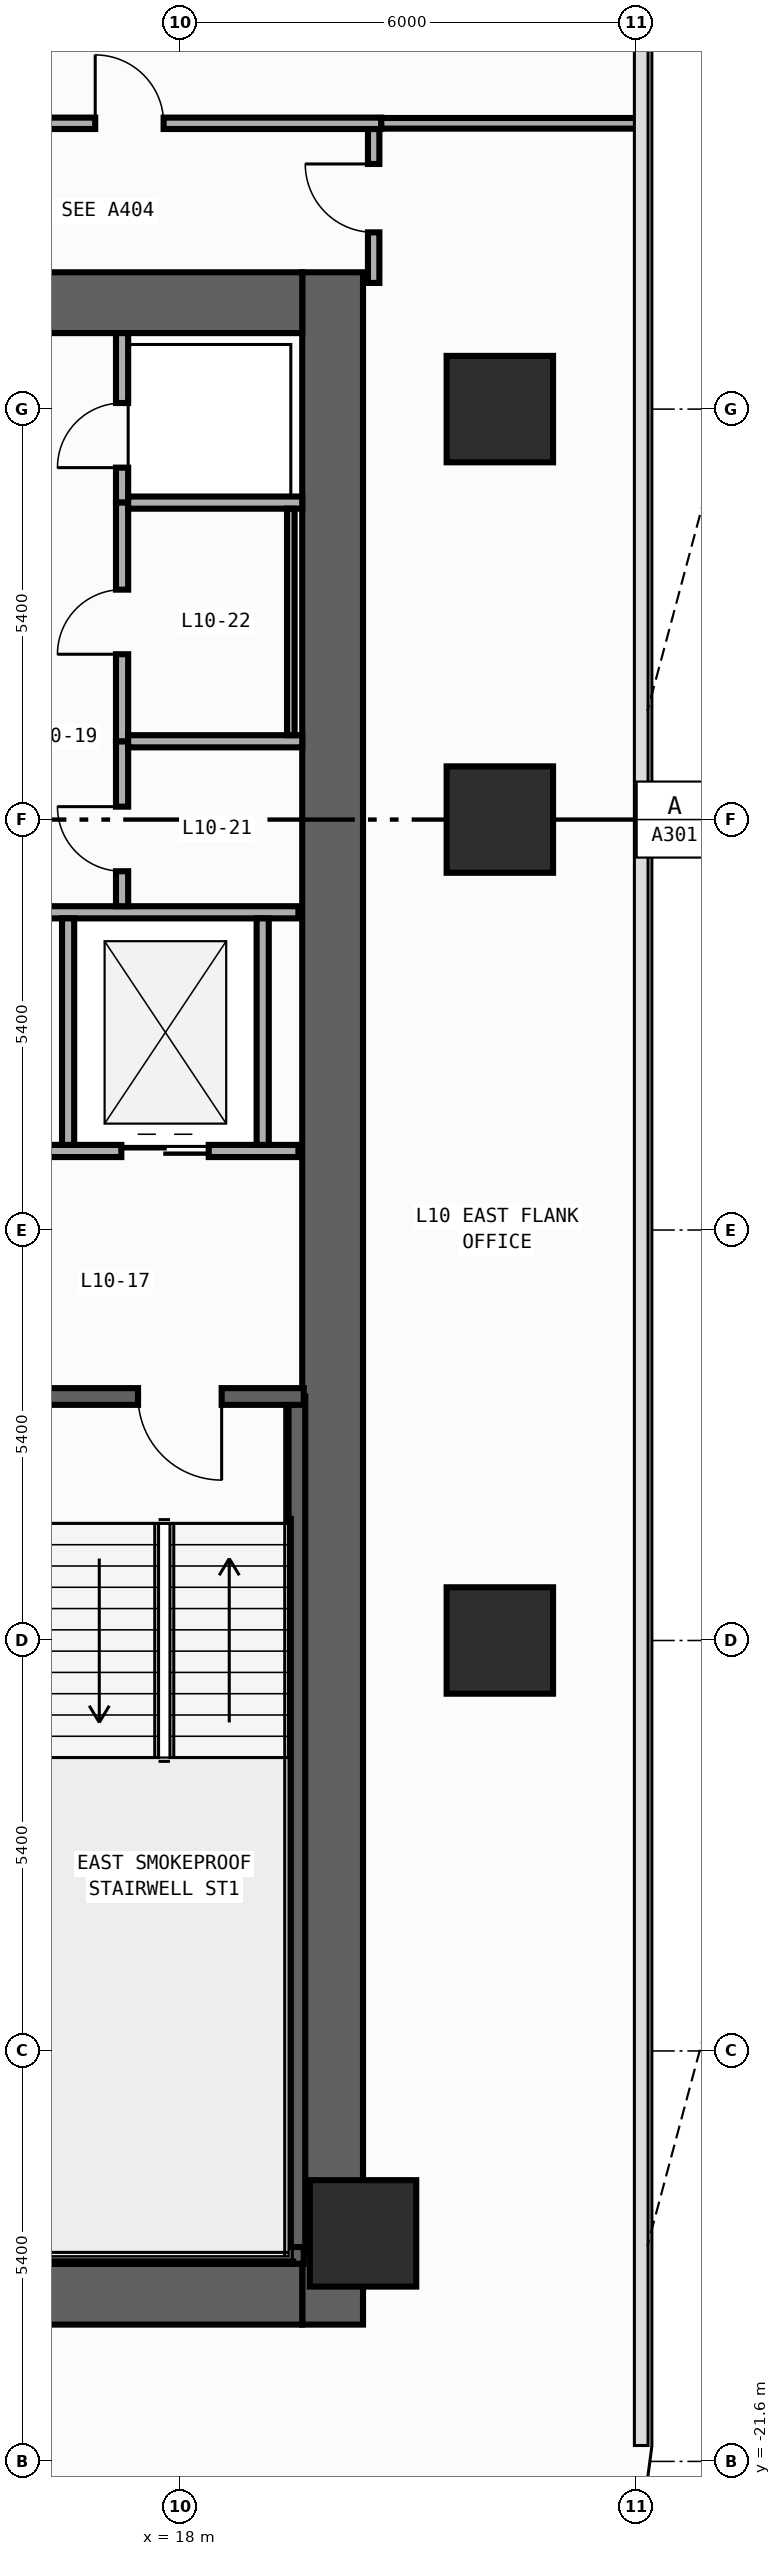
"""IFC4 building model, lengths in metres.
Left out: names, types, materials, properties, quantities, classifications, styles, units other than length and angle.
Written with IfcOpenShell. Run it as: python <this file> out.ifc"""

import sys

from ifc_helpers import new_model, si_unit, direction, frame, frame_2d, origin, origin_2d, place, context, subcontext, project, spatial, rectangle, extrude, element, fill, save


model = new_model("IFC4")
c1 = context("Model", 3, precision=1e-05, world=origin(), true_north=direction((0.0, 1.0)))
c2 = subcontext(c1, "Body", "Model", "MODEL_VIEW")
j1 = project(units=[si_unit("LENGTHUNIT", "METRE"), si_unit("PLANEANGLEUNIT", "RADIAN")], contexts=[c1])
p1 = place(None, origin())
s1 = spatial("IfcSite", under=j1, at=p1, CompositionType="ELEMENT")
p2 = place(p1, origin())
s2 = spatial("IfcBuilding", under=s1, at=p2, CompositionType="ELEMENT")
p3 = place(p2, frame((0.0, 0.0, 42.8)))
s3 = spatial("IfcBuildingStorey", under=s2, at=p3, CompositionType="ELEMENT", Elevation=42.8)
p4 = place(p3, frame((20.0, -19.8, 0.0), z_axis=(0.0, 0.0, 1.0), x_axis=(0.0, 1.0, 0.0)))
e1 = element("IfcWall", 1, at=p4, inside=s3, PredefinedType="SHEAR", context=c2, shape_type="SweptSolid", body=[
    extrude(rectangle(XDim=27.0, YDim=0.8, at=frame_2d((13.5, 0.0))), origin(), (0.0, 0.0, 1.0), 3.94),
])
for number, where, z_axis, x_axis in (
    (2, (12.8, -19.4, 0.0), (0.0, 0.0, 1.0), (1.0, 0.0, 0.0)),
    (3, (12.8, 6.8, 0.0), (0.0, 0.0, 1.0), (1.0, 0.0, 0.0)),
):
    element("IfcWall", number, at=place(p3, frame(where, z_axis=z_axis, x_axis=x_axis)), inside=s3, PredefinedType="SHEAR", context=c2, shape_type="SweptSolid", body=[
        extrude(rectangle(XDim=6.8, YDim=0.8, at=frame_2d((3.4, 0.0))), origin(), (0.0, 0.0, 1.0), 3.94),
    ])
p5 = place(p3, frame((19.53, -18.89, 0.0), z_axis=(0.0, 0.0, 1.0), x_axis=(0.0, 1.0, 0.0)))
e4 = element("IfcWall", 4, at=p5, inside=s3, PredefinedType="SHEAR", context=c2, shape_type="SweptSolid", body=[
    extrude(rectangle(XDim=11.3, YDim=0.22, at=frame_2d((5.65, 0.0))), origin(), (0.0, 0.0, 1.0), 3.94),
])
p6 = place(p3, frame((15.705, -18.89, 0.0), z_axis=(0.0, 0.0, 1.0), x_axis=(1.0, 0.0, 0.0)))
e5 = element("IfcWall", 5, at=p6, inside=s3, PredefinedType="SHEAR", context=c2, shape_type="SweptSolid", body=[
    extrude(rectangle(XDim=3.915, YDim=0.22, at=frame_2d((1.958, 0.0))), origin(), (0.0, 0.0, 1.0), 3.94),
])
p7 = place(p3, frame((19.62, -7.59, 0.0), z_axis=(0.0, 0.0, 1.0), x_axis=(-1.0, 0.0, 0.0)))
e6 = element("IfcWall", 6, at=p7, inside=s3, PredefinedType="SHEAR", context=c2, shape_type="SweptSolid", body=[
    extrude(rectangle(XDim=3.915, YDim=0.22, at=frame_2d((1.958, 0.0))), origin(), (0.0, 0.0, 1.0), 3.94),
])
p8 = place(p7, frame((1.08, 0.0, 0.0)))
e7 = element("IfcOpeningElement", 7, at=p8, cuts=e6, PredefinedType="OPENING", context=c2, shape_type="SweptSolid", body=[
    extrude(rectangle(XDim=1.1, YDim=2.2, at=frame_2d((0.55, 1.1))), frame((0.0, 0.12, 0.0), z_axis=(0.0, -1.0, 0.0), x_axis=(1.0, 0.0, 0.0)), (0.0, 0.0, 1.0), 0.24),
])
for number, where, z_axis, x_axis in (
    (8, (20.4, -18.6, 0.0), (0.0, 0.0, 1.0), (1.0, 0.0, 0.0)),
    (9, (22.2, -10.8, 0.0), (0.0, 0.0, 1.0), (1.0, 0.0, 0.0)),
    (10, (22.2, 0.0, 0.0), (0.0, 0.0, 1.0), (1.0, 0.0, 0.0)),
    (11, (22.2, 5.4, 0.0), (0.0, 0.0, 1.0), (1.0, 0.0, 0.0)),
):
    element("IfcColumn", number, at=place(p3, frame(where, z_axis=z_axis, x_axis=x_axis)), inside=s3, PredefinedType="COLUMN", context=c2, shape_type="SweptSolid", body=[
        extrude(rectangle(XDim=1.4, YDim=1.4, at=origin_2d()), origin(), (0.0, 0.0, 1.0), 4.2),
    ])
p9 = place(p3, frame((15.75, -4.36, 0.0), z_axis=(0.0, 0.0, 1.0), x_axis=(1.0, 0.0, 0.0)))
e12 = element("IfcWall", 12, at=p9, inside=s3, PredefinedType="STANDARD", context=c2, shape_type="SweptSolid", body=[
    extrude(rectangle(XDim=3.8, YDim=0.16, at=frame_2d((1.9, 0.0))), origin(), (0.0, 0.0, 1.0), 3.94),
])
p10 = place(p9, frame((1.47, 0.0, 0.0)))
e13 = element("IfcOpeningElement", 13, at=p10, cuts=e12, PredefinedType="OPENING", context=c2, shape_type="SweptSolid", body=[
    extrude(rectangle(XDim=1.15, YDim=2.2, at=frame_2d((0.575, 1.1))), frame((0.0, 0.09, 0.0), z_axis=(0.0, -1.0, 0.0), x_axis=(1.0, 0.0, 0.0)), (0.0, 0.0, 1.0), 0.18),
])
p11 = place(p3, frame((15.75, -1.22, 0.0), z_axis=(0.0, 0.0, 1.0), x_axis=(1.0, 0.0, 0.0)))
e14 = element("IfcWall", 14, at=p11, inside=s3, PredefinedType="STANDARD", context=c2, shape_type="SweptSolid", body=[
    extrude(rectangle(XDim=3.8, YDim=0.16, at=frame_2d((1.9, 0.0))), origin(), (0.0, 0.0, 1.0), 3.94),
])
for number, where, z_axis, x_axis in (
    (15, (16.52, -4.28, 0.0), (0.0, 0.0, 1.0), (0.0, 1.0, 0.0)),
    (16, (19.08, -4.28, 0.0), (0.0, 0.0, 1.0), (0.0, 1.0, 0.0)),
):
    element("IfcWall", number, at=place(p3, frame(where, z_axis=z_axis, x_axis=x_axis)), inside=s3, PredefinedType="STANDARD", context=c2, shape_type="SweptSolid", body=[
        extrude(rectangle(XDim=2.98, YDim=0.16, at=frame_2d((1.49, 0.0))), origin(), (0.0, 0.0, 1.0), 3.94),
    ])
p12 = place(p3, frame((17.23, 4.17, 0.0), z_axis=(0.0, 0.0, 1.0), x_axis=(0.0, 1.0, 0.0)))
e17 = element("IfcWall", 17, at=p12, inside=s3, PredefinedType="PARTITIONING", context=c2, shape_type="SweptSolid", body=[
    extrude(rectangle(XDim=2.23, YDim=0.16, at=frame_2d((1.115, 0.0))), origin(), (0.0, 0.0, 1.0), 3.94),
])
p13 = place(p12, frame((0.46, 0.0, 0.0)))
e18 = element("IfcOpeningElement", 18, at=p13, cuts=e17, PredefinedType="OPENING", context=c2, shape_type="SweptSolid", body=[
    extrude(rectangle(XDim=0.85, YDim=2.1, at=frame_2d((0.425, 1.05))), frame((0.0, 0.09, 0.0), z_axis=(0.0, -1.0, 0.0), x_axis=(1.0, 0.0, 0.0)), (0.0, 0.0, 1.0), 0.18),
])
p14 = place(p3, frame((17.23, -1.14, 0.0), z_axis=(0.0, 0.0, 1.0), x_axis=(0.0, 1.0, 0.0)))
e19 = element("IfcWall", 19, at=p14, inside=s3, PredefinedType="PARTITIONING", context=c2, shape_type="SweptSolid", body=[
    extrude(rectangle(XDim=2.17, YDim=0.16, at=frame_2d((1.085, 0.0))), origin(), (0.0, 0.0, 1.0), 3.94),
])
p15 = place(p14, frame((0.46, 0.0, 0.0)))
e20 = element("IfcOpeningElement", 20, at=p15, cuts=e19, PredefinedType="OPENING", context=c2, shape_type="SweptSolid", body=[
    extrude(rectangle(XDim=0.85, YDim=2.1, at=frame_2d((0.425, 1.05))), frame((0.0, 0.09, 0.0), z_axis=(0.0, -1.0, 0.0), x_axis=(1.0, 0.0, 0.0)), (0.0, 0.0, 1.0), 0.18),
])
p16 = place(p3, frame((17.23, 1.03, 0.0), z_axis=(0.0, 0.0, 1.0), x_axis=(0.0, 1.0, 0.0)))
e21 = element("IfcWall", 21, at=p16, inside=s3, PredefinedType="PARTITIONING", context=c2, shape_type="SweptSolid", body=[
    extrude(rectangle(XDim=3.14, YDim=0.16, at=frame_2d((1.57, 0.0))), origin(), (0.0, 0.0, 1.0), 3.94),
])
p17 = place(p16, frame((1.145, 0.0, 0.0)))
e22 = element("IfcOpeningElement", 22, at=p17, cuts=e21, PredefinedType="OPENING", context=c2, shape_type="SweptSolid", body=[
    extrude(rectangle(XDim=0.85, YDim=2.1, at=frame_2d((0.425, 1.05))), frame((0.0, 0.09, 0.0), z_axis=(0.0, -1.0, 0.0), x_axis=(1.0, 0.0, 0.0)), (0.0, 0.0, 1.0), 0.18),
])
for number, where, z_axis, x_axis in (
    (23, (17.31, 4.17, 0.0), (0.0, 0.0, 1.0), (1.0, 0.0, 0.0)),
    (24, (17.31, 1.03, 0.0), (0.0, 0.0, 1.0), (1.0, 0.0, 0.0)),
):
    element("IfcWall", number, at=place(p3, frame(where, z_axis=z_axis, x_axis=x_axis)), inside=s3, PredefinedType="PARTITIONING", context=c2, shape_type="SweptSolid", body=[
        extrude(rectangle(XDim=2.29, YDim=0.16, at=frame_2d((1.145, 0.0))), origin(), (0.0, 0.0, 1.0), 3.94),
    ])
p18 = place(p3, frame((20.54, 7.06, 0.0), z_axis=(0.0, 0.0, 1.0), x_axis=(0.0, 1.0, 0.0)))
e25 = element("IfcWall", 25, at=p18, inside=s3, PredefinedType="PARTITIONING", context=c2, shape_type="SweptSolid", body=[
    extrude(rectangle(XDim=2.025, YDim=0.15, at=frame_2d((1.012, 0.0))), origin(), (0.0, 0.0, 1.0), 3.94),
])
p19 = place(p18, frame((0.665, 0.0, 0.0)))
e26 = element("IfcOpeningElement", 26, at=p19, cuts=e25, PredefinedType="OPENING", context=c2, shape_type="SweptSolid", body=[
    extrude(rectangle(XDim=0.9, YDim=2.15, at=frame_2d((0.45, 1.075))), frame((0.0, 0.085, 0.0), z_axis=(0.0, -1.0, 0.0), x_axis=(1.0, 0.0, 0.0)), (0.0, 0.0, 1.0), 0.17),
])
p20 = place(p3, frame((11.81, 9.16, 0.0), z_axis=(0.0, 0.0, 1.0), x_axis=(1.0, 0.0, 0.0)))
e27 = element("IfcWall", 27, at=p20, inside=s3, PredefinedType="PARTITIONING", context=c2, shape_type="SweptSolid", body=[
    extrude(rectangle(XDim=8.83, YDim=0.15, at=frame_2d((4.415, 0.0))), origin(), (0.0, 0.0, 1.0), 3.94),
])
p21 = place(p20, frame((5.067, 0.0, 0.0)))
e28 = element("IfcOpeningElement", 28, at=p21, cuts=e27, PredefinedType="OPENING", context=c2, shape_type="SweptSolid", body=[
    extrude(rectangle(XDim=0.9, YDim=2.15, at=frame_2d((0.45, 1.075))), frame((0.0, 0.085, 0.0), z_axis=(0.0, -1.0, 0.0), x_axis=(1.0, 0.0, 0.0)), (0.0, 0.0, 1.0), 0.17),
])
p22 = place(p3, frame((20.64, 9.16, 0.0), z_axis=(0.0, 0.0, 1.0), x_axis=(1.0, 0.0, 0.0)))
e29 = element("IfcWall", 29, at=p22, inside=s3, PredefinedType="PARTITIONING", context=c2, shape_type="SweptSolid", body=[
    extrude(rectangle(XDim=3.415, YDim=0.14, at=frame_2d((1.708, 0.0))), origin(), (0.0, 0.0, 1.0), 3.94),
])
p23 = place(p3, frame((19.45, 4.09, 0.0), z_axis=(0.0, 0.0, 1.0), x_axis=(0.0, -1.0, 0.0)))
e30 = element("IfcWall", 30, at=p23, inside=s3, PredefinedType="PARTITIONING", context=c2, shape_type="SweptSolid", body=[
    extrude(rectangle(XDim=2.98, YDim=0.1, at=frame_2d((1.49, 0.0))), origin(), (0.0, 0.0, 1.0), 3.94),
])
p24 = place(p8, origin())
e31 = element("IfcDoor", 31, at=p24, inside=s3, OperationType="SINGLE_SWING_LEFT", PredefinedType="DOOR", context=c2, shape_type="SweptSolid", body=[
    extrude(rectangle(XDim=1.1, YDim=2.2, at=frame_2d((0.55, 1.1))), frame((0.0, 0.025, 0.0), z_axis=(0.0, -1.0, 0.0), x_axis=(1.0, 0.0, 0.0)), (0.0, 0.0, 1.0), 0.05),
])
fill(e7, e31)
p25 = place(p10, origin())
e32 = element("IfcDoor", 32, at=p25, inside=s3, OperationType="DOUBLE_DOOR_SLIDING", PredefinedType="DOOR", context=c2, shape_type="SweptSolid", body=[
    extrude(rectangle(XDim=1.15, YDim=2.2, at=frame_2d((0.575, 1.1))), frame((0.0, 0.025, 0.0), z_axis=(0.0, -1.0, 0.0), x_axis=(1.0, 0.0, 0.0)), (0.0, 0.0, 1.0), 0.05),
])
fill(e13, e32)
p26 = place(p13, origin())
e33 = element("IfcDoor", 33, at=p26, inside=s3, OperationType="SINGLE_SWING_LEFT", PredefinedType="DOOR", context=c2, shape_type="SweptSolid", body=[
    extrude(rectangle(XDim=0.85, YDim=2.1, at=frame_2d((0.425, 1.05))), frame((0.0, 0.025, 0.0), z_axis=(0.0, -1.0, 0.0), x_axis=(1.0, 0.0, 0.0)), (0.0, 0.0, 1.0), 0.05),
])
fill(e18, e33)
p27 = place(p15, origin())
e34 = element("IfcDoor", 34, at=p27, inside=s3, OperationType="SINGLE_SWING_RIGHT", PredefinedType="DOOR", context=c2, shape_type="SweptSolid", body=[
    extrude(rectangle(XDim=0.85, YDim=2.1, at=frame_2d((0.425, 1.05))), frame((0.0, 0.025, 0.0), z_axis=(0.0, -1.0, 0.0), x_axis=(1.0, 0.0, 0.0)), (0.0, 0.0, 1.0), 0.05),
])
fill(e20, e34)
p28 = place(p17, origin())
e35 = element("IfcDoor", 35, at=p28, inside=s3, OperationType="SINGLE_SWING_LEFT", PredefinedType="DOOR", context=c2, shape_type="SweptSolid", body=[
    extrude(rectangle(XDim=0.85, YDim=2.1, at=frame_2d((0.425, 1.05))), frame((0.0, 0.025, 0.0), z_axis=(0.0, -1.0, 0.0), x_axis=(1.0, 0.0, 0.0)), (0.0, 0.0, 1.0), 0.05),
])
fill(e22, e35)
p29 = place(p19, origin())
e36 = element("IfcDoor", 36, at=p29, inside=s3, OperationType="SINGLE_SWING_RIGHT", PredefinedType="DOOR", context=c2, shape_type="SweptSolid", body=[
    extrude(rectangle(XDim=0.9, YDim=2.15, at=frame_2d((0.45, 1.075))), frame((0.0, 0.025, 0.0), z_axis=(0.0, -1.0, 0.0), x_axis=(1.0, 0.0, 0.0)), (0.0, 0.0, 1.0), 0.05),
])
fill(e26, e36)
p30 = place(p21, origin())
e37 = element("IfcDoor", 37, at=p30, inside=s3, OperationType="SINGLE_SWING_LEFT", PredefinedType="DOOR", context=c2, shape_type="SweptSolid", body=[
    extrude(rectangle(XDim=0.9, YDim=2.15, at=frame_2d((0.45, 1.075))), frame((0.0, 0.025, 0.0), z_axis=(0.0, -1.0, 0.0), x_axis=(1.0, 0.0, 0.0)), (0.0, 0.0, 1.0), 0.05),
])
fill(e28, e37)
save(model, sys.argv[1])
